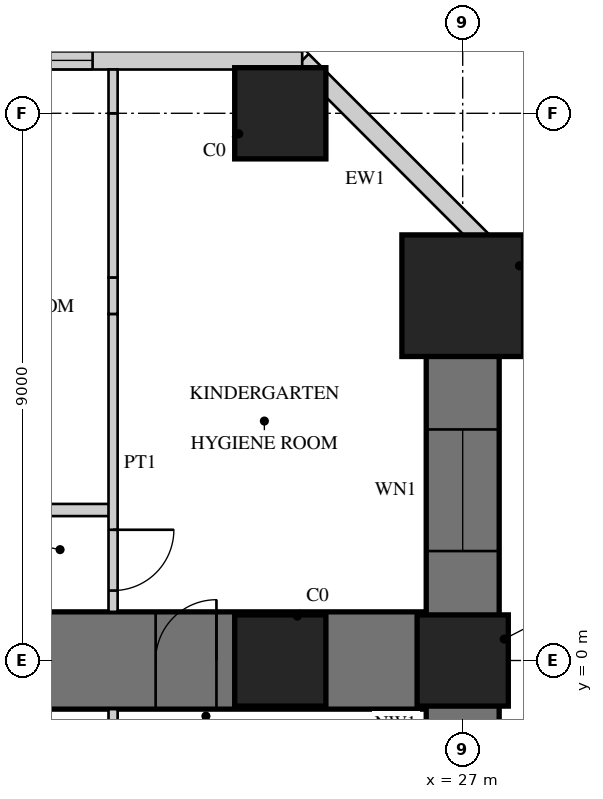
"""IFC4 building model, lengths in metres.
Left out: names, types, materials, properties, quantities, classifications, styles, units other than length and angle.
Written with IfcOpenShell. Run it as: python <this file> out.ifc"""

import sys

from ifc_helpers import new_model, si_unit, direction, frame, frame_2d, origin, origin_2d, place, context, subcontext, project, spatial, rectangle, hollow_rectangle, extrude, element, fill, save


model = new_model("IFC4")
c1 = context("Model", 3, precision=1e-05, world=origin(), true_north=direction((0.0, 1.0)))
c2 = subcontext(c1, "Body", "Model", "MODEL_VIEW")
j1 = project(units=[si_unit("LENGTHUNIT", "METRE"), si_unit("PLANEANGLEUNIT", "RADIAN")], contexts=[c1])
p1 = place(None, origin())
s1 = spatial("IfcSite", under=j1, at=p1, CompositionType="ELEMENT")
p2 = place(p1, origin())
s2 = spatial("IfcBuilding", under=s1, at=p2, CompositionType="ELEMENT")
p3 = place(p2, frame((0.0, 0.0, 5.0)))
s3 = spatial("IfcBuildingStorey", under=s2, at=p3, CompositionType="ELEMENT", Elevation=5.0)
p4 = place(p3, frame((9.0, 0.0, 0.0), z_axis=(0.0, 0.0, 1.0), x_axis=(1.0, 0.0, 0.0)))
e1 = element("IfcWall", 1, at=p4, inside=s3, PredefinedType="SHEAR", context=c2, shape_type="SweptSolid", body=[
    extrude(rectangle(XDim=18.0, YDim=1.6, at=frame_2d((9.0, 0.0))), origin(), (0.0, 0.0, 1.0), 4.5),
])
p5 = place(p4, frame((1.85, 0.0, 0.0)))
e2 = element("IfcOpeningElement", 2, at=p5, cuts=e1, PredefinedType="OPENING", context=c2, shape_type="SweptSolid", body=[
    extrude(rectangle(XDim=1.0, YDim=2.2, at=frame_2d((0.5, 1.1))), frame((0.0, 0.81, 0.0), z_axis=(0.0, -1.0, 0.0), x_axis=(1.0, 0.0, 0.0)), (0.0, 0.0, 1.0), 1.62),
])
p6 = place(p4, frame((7.2, 0.0, 0.0)))
e3 = element("IfcOpeningElement", 3, at=p6, cuts=e1, PredefinedType="OPENING", context=c2, shape_type="SweptSolid", body=[
    extrude(rectangle(XDim=1.0, YDim=2.2, at=frame_2d((0.5, 1.1))), frame((0.0, 0.81, 0.0), z_axis=(0.0, -1.0, 0.0), x_axis=(1.0, 0.0, 0.0)), (0.0, 0.0, 1.0), 1.62),
])
p7 = place(p4, frame((12.95, 0.0, 0.0)))
e4 = element("IfcOpeningElement", 4, at=p7, cuts=e1, PredefinedType="OPENING", context=c2, shape_type="SweptSolid", body=[
    extrude(rectangle(XDim=1.0, YDim=2.2, at=frame_2d((0.5, 1.1))), frame((0.0, 0.81, 0.0), z_axis=(0.0, -1.0, 0.0), x_axis=(1.0, 0.0, 0.0)), (0.0, 0.0, 1.0), 1.62),
])
p8 = place(p3, frame((27.0, -6.0, 0.0), z_axis=(0.0, 0.0, 1.0), x_axis=(0.0, 1.0, 0.0)))
e5 = element("IfcWall", 5, at=p8, inside=s3, PredefinedType="SHEAR", context=c2, shape_type="SweptSolid", body=[
    extrude(rectangle(XDim=12.0, YDim=1.2, at=frame_2d((6.0, 0.0))), origin(), (0.0, 0.0, 1.0), 4.5),
])
p9 = place(p8, frame((2.2, 0.0, 0.9)))
e6 = element("IfcOpeningElement", 6, at=p9, cuts=e5, PredefinedType="OPENING", context=c2, shape_type="SweptSolid", body=[
    extrude(rectangle(XDim=2.0, YDim=1.8, at=frame_2d((1.0, 0.9))), frame((0.0, 0.61, 0.0), z_axis=(0.0, -1.0, 0.0), x_axis=(1.0, 0.0, 0.0)), (0.0, 0.0, 1.0), 1.22),
])
p10 = place(p8, frame((7.8, 0.0, 0.9)))
e7 = element("IfcOpeningElement", 7, at=p10, cuts=e5, PredefinedType="OPENING", context=c2, shape_type="SweptSolid", body=[
    extrude(rectangle(XDim=2.0, YDim=1.8, at=frame_2d((1.0, 0.9))), frame((0.0, 0.61, 0.0), z_axis=(0.0, -1.0, 0.0), x_axis=(1.0, 0.0, 0.0)), (0.0, 0.0, 1.0), 1.22),
])
for number, where, z_axis, x_axis in (
    (8, (24.0, 9.0, 0.0), (0.0, 0.0, 1.0), (1.0, 0.0, 0.0)),
    (9, (27.0, 0.0, 0.0), (0.0, 0.0, 1.0), (1.0, 0.0, 0.0)),
):
    element("IfcColumn", number, at=place(p3, frame(where, z_axis=z_axis, x_axis=x_axis)), inside=s3, PredefinedType="COLUMN", context=c2, shape_type="SweptSolid", body=[
        extrude(rectangle(XDim=1.5, YDim=1.5, at=origin_2d()), origin(), (0.0, 0.0, 1.0), 4.5),
    ])
p11 = place(p3, frame((27.0, 6.0, 0.0), z_axis=(0.0, 0.0, 1.0), x_axis=(1.0, 0.0, 0.0)))
e10 = element("IfcColumn", 10, at=p11, inside=s3, PredefinedType="COLUMN", context=c2, shape_type="SweptSolid", body=[
    extrude(rectangle(XDim=2.0, YDim=2.0, at=origin_2d()), origin(), (0.0, 0.0, 1.0), 4.5),
])
p12 = place(p3, frame((24.0, 0.0, 0.0), z_axis=(0.0, 0.0, 1.0), x_axis=(1.0, 0.0, 0.0)))
e11 = element("IfcColumn", 11, at=p12, inside=s3, PredefinedType="COLUMN", context=c2, shape_type="SweptSolid", body=[
    extrude(rectangle(XDim=1.5, YDim=1.5, at=origin_2d()), origin(), (0.0, 0.0, 1.0), 4.5),
])
p13 = place(p3, frame((27.6, 6.63, 0.0), z_axis=(0.0, 0.0, 1.0), x_axis=(-0.707106781187, 0.707106781187, 0.0)))
e12 = element("IfcWall", 12, at=p13, inside=s3, PredefinedType="SOLIDWALL", context=c2, shape_type="SweptSolid", body=[
    extrude(rectangle(XDim=4.582, YDim=0.3, at=frame_2d((2.291, 0.0))), origin(), (0.0, 0.0, 1.0), 4.3),
])
p14 = place(p3, frame((24.36, 9.87, 0.0), z_axis=(0.0, 0.0, 1.0), x_axis=(-1.0, 0.0, 0.0)))
e13 = element("IfcWall", 13, at=p14, inside=s3, PredefinedType="SOLIDWALL", context=c2, shape_type="SweptSolid", body=[
    extrude(rectangle(XDim=14.49, YDim=0.3, at=frame_2d((7.245, 0.0))), origin(), (0.0, 0.0, 1.0), 4.3),
])
p15 = place(p14, frame((10.9, 0.0, 0.0)))
e14 = element("IfcOpeningElement", 14, at=p15, cuts=e13, PredefinedType="OPENING", context=c2, shape_type="SweptSolid", body=[
    extrude(rectangle(XDim=1.0, YDim=2.4, at=frame_2d((0.5, 1.2))), frame((0.0, 0.16, 0.0), z_axis=(0.0, -1.0, 0.0), x_axis=(1.0, 0.0, 0.0)), (0.0, 0.0, 1.0), 0.32),
])
p16 = place(p14, frame((3.447, 0.0, 0.6)))
e15 = element("IfcOpeningElement", 15, at=p16, cuts=e13, PredefinedType="OPENING", context=c2, shape_type="SweptSolid", body=[
    extrude(rectangle(XDim=1.8, YDim=2.1, at=frame_2d((0.9, 1.05))), frame((0.0, 0.16, 0.0), z_axis=(0.0, -1.0, 0.0), x_axis=(1.0, 0.0, 0.0)), (0.0, 0.0, 1.0), 0.32),
])
p17 = place(p14, frame((12.141, 0.0, 0.6)))
e16 = element("IfcOpeningElement", 16, at=p17, cuts=e13, PredefinedType="OPENING", context=c2, shape_type="SweptSolid", body=[
    extrude(rectangle(XDim=1.8, YDim=2.1, at=frame_2d((0.9, 1.05))), frame((0.0, 0.16, 0.0), z_axis=(0.0, -1.0, 0.0), x_axis=(1.0, 0.0, 0.0)), (0.0, 0.0, 1.0), 0.32),
])
p18 = place(p3, frame((9.65, 2.475, 0.0), z_axis=(0.0, 0.0, 1.0), x_axis=(1.0, 0.0, 0.0)))
e17 = element("IfcWall", 17, at=p18, inside=s3, PredefinedType="SOLIDWALL", context=c2, shape_type="SweptSolid", body=[
    extrude(rectangle(XDim=11.6, YDim=0.2, at=frame_2d((5.8, 0.0))), origin(), (0.0, 0.0, 1.0), 4.3),
])
p19 = place(p18, frame((1.2, 0.0, 0.0)))
e18 = element("IfcOpeningElement", 18, at=p19, cuts=e17, PredefinedType="OPENING", context=c2, shape_type="SweptSolid", body=[
    extrude(rectangle(XDim=1.0, YDim=2.2, at=frame_2d((0.5, 1.1))), frame((0.0, 0.11, 0.0), z_axis=(0.0, -1.0, 0.0), x_axis=(1.0, 0.0, 0.0)), (0.0, 0.0, 1.0), 0.22),
])
p20 = place(p18, frame((6.55, 0.0, 0.0)))
e19 = element("IfcOpeningElement", 19, at=p20, cuts=e17, PredefinedType="OPENING", context=c2, shape_type="SweptSolid", body=[
    extrude(rectangle(XDim=1.0, YDim=2.2, at=frame_2d((0.5, 1.1))), frame((0.0, 0.11, 0.0), z_axis=(0.0, -1.0, 0.0), x_axis=(1.0, 0.0, 0.0)), (0.0, 0.0, 1.0), 0.22),
])
p21 = place(p3, frame((21.25, -5.7, 0.0), z_axis=(0.0, 0.0, 1.0), x_axis=(0.0, 1.0, 0.0)))
e20 = element("IfcWall", 20, at=p21, inside=s3, PredefinedType="PARTITIONING", context=c2, shape_type="SweptSolid", body=[
    extrude(rectangle(XDim=4.9, YDim=0.15, at=frame_2d((2.45, 0.0))), origin(), (0.0, 0.0, 1.0), 3.35),
])
p22 = place(p3, frame((21.25, 0.8, 0.0), z_axis=(0.0, 0.0, 1.0), x_axis=(0.0, 1.0, 0.0)))
e21 = element("IfcWall", 21, at=p22, inside=s3, PredefinedType="PARTITIONING", context=c2, shape_type="SweptSolid", body=[
    extrude(rectangle(XDim=4.9, YDim=0.15, at=frame_2d((2.45, 0.0))), origin(), (0.0, 0.0, 1.0), 3.35),
])
p23 = place(p22, frame((0.35, 0.0, 0.0)))
e22 = element("IfcOpeningElement", 22, at=p23, cuts=e21, PredefinedType="OPENING", context=c2, shape_type="SweptSolid", body=[
    extrude(rectangle(XDim=1.0, YDim=2.2, at=frame_2d((0.5, 1.1))), frame((0.0, 0.085, 0.0), z_axis=(0.0, -1.0, 0.0), x_axis=(1.0, 0.0, 0.0)), (0.0, 0.0, 1.0), 0.17),
])
p24 = place(p3, frame((21.25, 5.7, 0.0), z_axis=(0.0, 0.0, 1.0), x_axis=(0.0, 1.0, 0.0)))
e23 = element("IfcWall", 23, at=p24, inside=s3, PredefinedType="PARTITIONING", context=c2, shape_type="SweptSolid", body=[
    extrude(rectangle(XDim=0.6, YDim=0.15, at=frame_2d((0.3, 0.0))), origin(), (0.0, 0.0, 1.0), 4.3),
])
p25 = place(p3, frame((21.25, 6.3, 0.0), z_axis=(0.0, 0.0, 1.0), x_axis=(0.0, 1.0, 0.0)))
e24 = element("IfcWall", 24, at=p25, inside=s3, PredefinedType="PARTITIONING", context=c2, shape_type="SweptSolid", body=[
    extrude(rectangle(XDim=2.7, YDim=0.15, at=frame_2d((1.35, 0.0))), origin(), (0.0, 0.0, 1.0), 3.35),
])
p26 = place(p3, frame((21.25, 9.0, 0.0), z_axis=(0.0, 0.0, 1.0), x_axis=(0.0, 1.0, 0.0)))
e25 = element("IfcWall", 25, at=p26, inside=s3, PredefinedType="PARTITIONING", context=c2, shape_type="SweptSolid", body=[
    extrude(rectangle(XDim=0.72, YDim=0.15, at=frame_2d((0.36, 0.0))), origin(), (0.0, 0.0, 1.0), 4.3),
])
p27 = place(p10, origin())
e26 = element("IfcWindow", 26, at=p27, inside=s3, PartitioningType="SINGLE_PANEL", PredefinedType="WINDOW", context=c2, shape_type="SweptSolid", body=[
    extrude(hollow_rectangle(XDim=2.0, YDim=1.8, WallThickness=0.06, at=frame_2d((1.0, 0.9))), frame((0.0, 0.03, 0.0), z_axis=(0.0, -1.0, 0.0), x_axis=(1.0, 0.0, 0.0)), (0.0, 0.0, 1.0), 0.06),
    extrude(rectangle(XDim=1.879, YDim=1.679, at=frame_2d((1.0, 0.9))), frame((0.0, 0.03, 0.0), z_axis=(0.0, -1.0, 0.0), x_axis=(1.0, 0.0, 0.0)), (0.0, 0.0, 1.0), 0.06),
])
fill(e7, e26)
p28 = place(p16, origin())
e27 = element("IfcWindow", 27, at=p28, inside=s3, PartitioningType="SINGLE_PANEL", PredefinedType="WINDOW", context=c2, shape_type="SweptSolid", body=[
    extrude(hollow_rectangle(XDim=1.8, YDim=2.1, WallThickness=0.06, at=frame_2d((0.9, 1.05))), frame((0.0, 0.03, 0.0), z_axis=(0.0, -1.0, 0.0), x_axis=(1.0, 0.0, 0.0)), (0.0, 0.0, 1.0), 0.06),
    extrude(rectangle(XDim=1.679, YDim=1.979, at=frame_2d((0.9, 1.05))), frame((0.0, 0.03, 0.0), z_axis=(0.0, -1.0, 0.0), x_axis=(1.0, 0.0, 0.0)), (0.0, 0.0, 1.0), 0.06),
])
fill(e15, e27)
p29 = place(p23, frame((1.0, 0.0, 0.0), z_axis=(0.0, 0.0, 1.0), x_axis=(-1.0, 0.0, 0.0)))
e28 = element("IfcDoor", 28, at=p29, inside=s3, OperationType="SINGLE_SWING_LEFT", PredefinedType="DOOR", context=c2, shape_type="SweptSolid", body=[
    extrude(rectangle(XDim=1.0, YDim=2.2, at=frame_2d((0.5, 1.1))), frame((0.0, 0.025, 0.0), z_axis=(0.0, -1.0, 0.0), x_axis=(1.0, 0.0, 0.0)), (0.0, 0.0, 1.0), 0.05),
])
fill(e22, e28)
p30 = place(p7, origin())
e29 = element("IfcDoor", 29, at=p30, inside=s3, OperationType="SINGLE_SWING_RIGHT", PredefinedType="DOOR", context=c2, shape_type="SweptSolid", body=[
    extrude(rectangle(XDim=1.0, YDim=2.2, at=frame_2d((0.5, 1.1))), frame((0.0, 0.025, 0.0), z_axis=(0.0, -1.0, 0.0), x_axis=(1.0, 0.0, 0.0)), (0.0, 0.0, 1.0), 0.05),
])
fill(e4, e29)
save(model, sys.argv[1])
